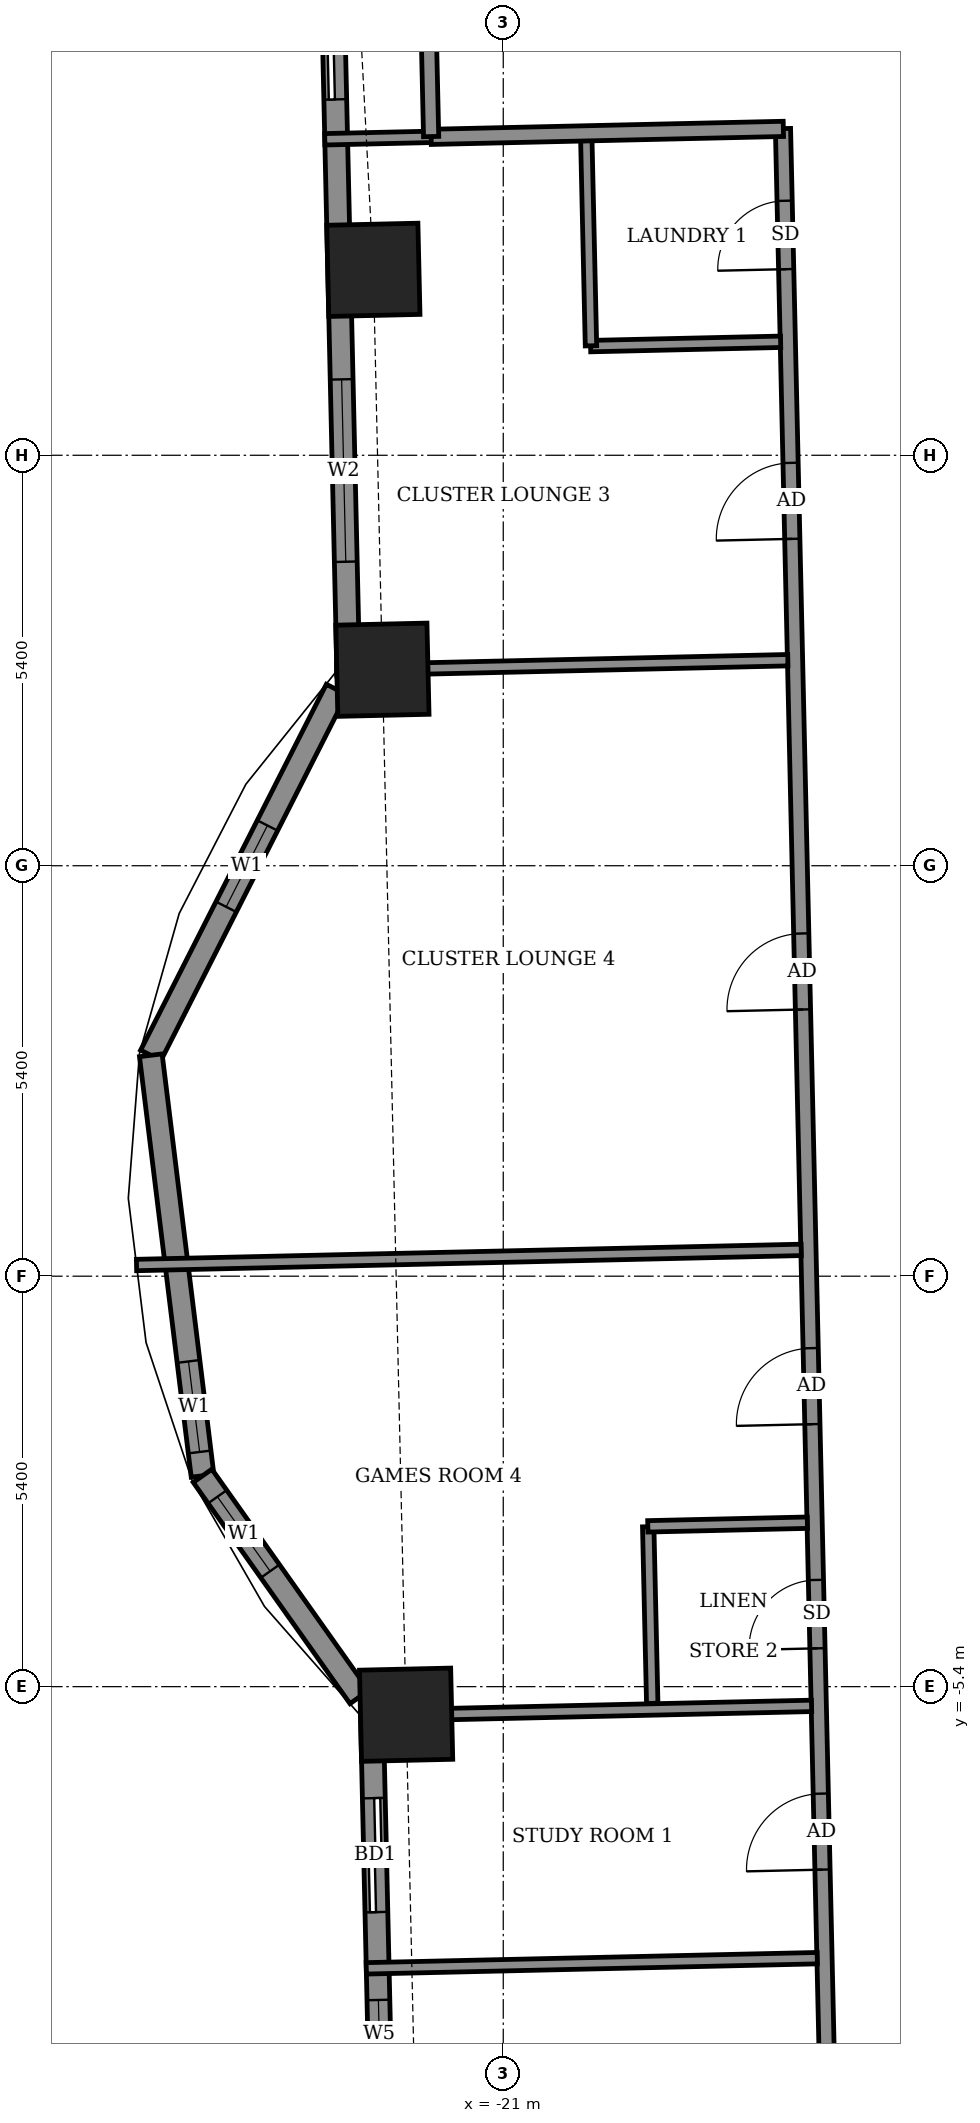
"""IFC4 building model, lengths in metres.
Left out: names, types, materials, properties, quantities, classifications, styles, units other than length and angle.
Written with IfcOpenShell. Run it as: python <this file> out.ifc"""

import sys

from ifc_helpers import new_model, si_unit, direction, frame, frame_2d, origin, origin_2d, place, context, subcontext, project, spatial, rectangle, extrude, element, fill, save


model = new_model("IFC4")
c1 = context("Model", 3, precision=1e-05, world=origin(), true_north=direction((0.0, 1.0)))
c2 = subcontext(c1, "Body", "Model", "MODEL_VIEW")
j1 = project(units=[si_unit("LENGTHUNIT", "METRE"), si_unit("PLANEANGLEUNIT", "RADIAN")], contexts=[c1])
p1 = place(None, origin())
s1 = spatial("IfcSite", under=j1, at=p1, CompositionType="ELEMENT")
p2 = place(p1, origin())
s2 = spatial("IfcBuilding", under=s1, at=p2, CompositionType="ELEMENT")
p3 = place(p2, frame((0.0, 0.0, 182.5)))
s3 = spatial("IfcBuildingStorey", under=s2, at=p3, CompositionType="ELEMENT", Elevation=182.5)
for number, where, z_axis, x_axis in (
    (1, (-22.278, -5.769, -0.55), (0.0, 0.0, 1.0), (0.023, -1.0, 0.0)),
    (2, (-22.709, 13.24, -0.55), (0.0, 0.0, 1.0), (0.023, -1.0, 0.0)),
    (3, (-22.59, 7.979, -0.55), (0.0, 0.0, 1.0), (0.023, -1.0, 0.0)),
):
    element("IfcColumn", number, at=place(p3, frame(where, z_axis=z_axis, x_axis=x_axis)), inside=s3, PredefinedType="COLUMN", context=c2, shape_type="SweptSolid", body=[
        extrude(rectangle(XDim=1.2, YDim=1.2, at=origin_2d()), origin(), (0.0, 0.0, 1.0), 3.6),
    ])
p4 = place(p3, frame((-23.275, 18.34, 0.0), z_axis=(0.0, 0.0, 1.0), x_axis=(0.022705985163, -0.999742185885, 0.0)))
e4 = element("IfcWall", 4, at=p4, inside=s3, PredefinedType="SOLIDWALL", context=c2, shape_type="SweptSolid", body=[
    extrude(rectangle(XDim=10.43, YDim=0.3, at=frame_2d((5.215, 0.0))), origin(), (0.0, 0.0, 1.0), 3.05),
])
p5 = place(p4, frame((1.359, 0.0, 0.0)))
e5 = element("IfcOpeningElement", 5, at=p5, cuts=e4, PredefinedType="OPENING", context=c2, shape_type="SweptSolid", body=[
    extrude(rectangle(XDim=1.5, YDim=2.4, at=frame_2d((0.75, 1.2))), frame((0.0, 0.16, 0.0), z_axis=(0.0, -1.0, 0.0), x_axis=(1.0, 0.0, 0.0)), (0.0, 0.0, 1.0), 0.32),
])
p6 = place(p4, frame((6.543, 0.0, 0.9)))
e6 = element("IfcOpeningElement", 6, at=p6, cuts=e4, PredefinedType="OPENING", context=c2, shape_type="SweptSolid", body=[
    extrude(rectangle(XDim=2.4, YDim=1.5, at=frame_2d((1.2, 0.75))), frame((0.0, 0.16, 0.0), z_axis=(0.0, -1.0, 0.0), x_axis=(1.0, 0.0, 0.0)), (0.0, 0.0, 1.0), 0.32),
])
p7 = place(p3, frame((-23.194, 7.719, 0.0), z_axis=(0.0, 0.0, 1.0), x_axis=(-0.452597193435, -0.891715078091, 0.0)))
e7 = element("IfcWall", 7, at=p7, inside=s3, PredefinedType="SOLIDWALL", context=c2, shape_type="SweptSolid", body=[
    extrude(rectangle(XDim=5.397, YDim=0.3, at=frame_2d((2.699, 0.0))), origin(), (0.0, 0.0, 1.0), 3.05),
])
p8 = place(p7, frame((2.007, 0.0, 0.9)))
e8 = element("IfcOpeningElement", 8, at=p8, cuts=e7, PredefinedType="OPENING", context=c2, shape_type="SweptSolid", body=[
    extrude(rectangle(XDim=1.2, YDim=1.5, at=frame_2d((0.6, 0.75))), frame((0.0, 0.16, 0.0), z_axis=(0.0, -1.0, 0.0), x_axis=(1.0, 0.0, 0.0)), (0.0, 0.0, 1.0), 0.32),
])
p9 = place(p3, frame((-25.637, 2.906, 0.0), z_axis=(0.0, 0.0, 1.0), x_axis=(0.122163831021, -0.992509948761, 0.0)))
e9 = element("IfcWall", 9, at=p9, inside=s3, PredefinedType="SOLIDWALL", context=c2, shape_type="SweptSolid", body=[
    extrude(rectangle(XDim=5.574, YDim=0.3, at=frame_2d((2.787, 0.0))), origin(), (0.0, 0.0, 1.0), 3.05),
])
p10 = place(p9, frame((4.058, 0.0, 0.9)))
e10 = element("IfcOpeningElement", 10, at=p10, cuts=e9, PredefinedType="OPENING", context=c2, shape_type="SweptSolid", body=[
    extrude(rectangle(XDim=1.2, YDim=1.5, at=frame_2d((0.6, 0.75))), frame((0.0, 0.16, 0.0), z_axis=(0.0, -1.0, 0.0), x_axis=(1.0, 0.0, 0.0)), (0.0, 0.0, 1.0), 0.32),
])
p11 = place(p3, frame((-24.956, -2.626, 0.0), z_axis=(0.0, 0.0, 1.0), x_axis=(0.578009745555, -0.816029861, 0.0)))
e11 = element("IfcWall", 11, at=p11, inside=s3, PredefinedType="SOLIDWALL", context=c2, shape_type="SweptSolid", body=[
    extrude(rectangle(XDim=3.567, YDim=0.3, at=frame_2d((1.784, 0.0))), origin(), (0.0, 0.0, 1.0), 3.05),
])
p12 = place(p11, frame((0.338, 0.0, 0.9)))
e12 = element("IfcOpeningElement", 12, at=p12, cuts=e11, PredefinedType="OPENING", context=c2, shape_type="SweptSolid", body=[
    extrude(rectangle(XDim=1.2, YDim=1.5, at=frame_2d((0.6, 0.75))), frame((0.0, 0.16, 0.0), z_axis=(0.0, -1.0, 0.0), x_axis=(1.0, 0.0, 0.0)), (0.0, 0.0, 1.0), 0.32),
])
p13 = place(p3, frame((-22.729, -5.725, 0.0), z_axis=(0.0, 0.0, 1.0), x_axis=(0.022726014582, -0.999741730779, 0.0)))
e13 = element("IfcWall", 13, at=p13, inside=s3, PredefinedType="SOLIDWALL", context=c2, shape_type="SweptSolid", body=[
    extrude(rectangle(XDim=10.829, YDim=0.3, at=frame_2d((5.414, 0.0))), origin(), (0.0, 0.0, 1.0), 3.05),
])
p14 = place(p13, frame((1.142, 0.0, 0.0)))
e14 = element("IfcOpeningElement", 14, at=p14, cuts=e13, PredefinedType="OPENING", context=c2, shape_type="SweptSolid", body=[
    extrude(rectangle(XDim=1.5, YDim=2.4, at=frame_2d((0.75, 1.2))), frame((0.0, 0.16, 0.0), z_axis=(0.0, -1.0, 0.0), x_axis=(1.0, 0.0, 0.0)), (0.0, 0.0, 1.0), 0.32),
])
p15 = place(p13, frame((3.798, 0.0, 0.9)))
e15 = element("IfcOpeningElement", 15, at=p15, cuts=e13, PredefinedType="OPENING", context=c2, shape_type="SweptSolid", body=[
    extrude(rectangle(XDim=0.9, YDim=1.5, at=frame_2d((0.45, 0.75))), frame((0.0, 0.16, 0.0), z_axis=(0.0, -1.0, 0.0), x_axis=(1.0, 0.0, 0.0)), (0.0, 0.0, 1.0), 0.32),
])
p16 = place(p13, frame((8.05, 0.0, 0.9)))
e16 = element("IfcOpeningElement", 16, at=p16, cuts=e13, PredefinedType="OPENING", context=c2, shape_type="SweptSolid", body=[
    extrude(rectangle(XDim=1.2, YDim=1.5, at=frame_2d((0.6, 0.75))), frame((0.0, 0.16, 0.0), z_axis=(0.0, -1.0, 0.0), x_axis=(1.0, 0.0, 0.0)), (0.0, 0.0, 1.0), 0.32),
])
p17 = place(p3, frame((-25.81, 8.155, 0.0), z_axis=(0.0, 0.0, 1.0), x_axis=(-0.022681332769, 0.999742745482, 0.0)))
e17 = element("IfcWall", 17, at=p17, inside=s3, PredefinedType="USERDEFINED", context=c2, shape_type="SweptSolid", body=[
    extrude(rectangle(XDim=3.875, YDim=0.55, at=frame_2d((1.938, 0.0))), origin(), (0.0, 0.0, 1.0), 0.8),
])
p18 = place(p3, frame((-25.308, -13.965, 0.0), z_axis=(0.0, 0.0, 1.0), x_axis=(-0.022662255828, 0.999743178102, 0.0)))
e18 = element("IfcWall", 18, at=p18, inside=s3, PredefinedType="USERDEFINED", context=c2, shape_type="SweptSolid", body=[
    extrude(rectangle(XDim=6.0, YDim=0.55, at=frame_2d((3.0, 0.0))), origin(), (0.0, 0.0, 1.0), 0.8),
])
p19 = place(p3, frame((-16.684, -12.919, 0.0), z_axis=(0.0, 0.0, 1.0), x_axis=(-0.022694293906, 0.999742451346, 0.0)))
e19 = element("IfcWall", 19, at=p19, inside=s3, PredefinedType="PARTITIONING", context=c2, shape_type="SweptSolid", body=[
    extrude(rectangle(XDim=28.024, YDim=0.2, at=frame_2d((14.012, 0.0))), origin(), (0.0, 0.0, 1.0), 3.05),
])
p20 = place(p19, frame((22.625, 0.0, 0.0)))
e20 = element("IfcOpeningElement", 20, at=p20, cuts=e19, PredefinedType="OPENING", context=c2, shape_type="SweptSolid", body=[
    extrude(rectangle(XDim=1.0, YDim=2.1, at=frame_2d((0.5, 1.05))), frame((0.0, 0.11, 0.0), z_axis=(0.0, -1.0, 0.0), x_axis=(1.0, 0.0, 0.0)), (0.0, 0.0, 1.0), 0.22),
])
p21 = place(p19, frame((26.174, 0.0, 0.0)))
e21 = element("IfcOpeningElement", 21, at=p21, cuts=e19, PredefinedType="OPENING", context=c2, shape_type="SweptSolid", body=[
    extrude(rectangle(XDim=0.9, YDim=2.1, at=frame_2d((0.45, 1.05))), frame((0.0, 0.11, 0.0), z_axis=(0.0, -1.0, 0.0), x_axis=(1.0, 0.0, 0.0)), (0.0, 0.0, 1.0), 0.22),
])
p22 = place(p19, frame((16.432, 0.0, 0.0)))
e22 = element("IfcOpeningElement", 22, at=p22, cuts=e19, PredefinedType="OPENING", context=c2, shape_type="SweptSolid", body=[
    extrude(rectangle(XDim=1.0, YDim=2.1, at=frame_2d((0.5, 1.05))), frame((0.0, 0.11, 0.0), z_axis=(0.0, -1.0, 0.0), x_axis=(1.0, 0.0, 0.0)), (0.0, 0.0, 1.0), 0.22),
])
p23 = place(p19, frame((10.975, 0.0, 0.0)))
e23 = element("IfcOpeningElement", 23, at=p23, cuts=e19, PredefinedType="OPENING", context=c2, shape_type="SweptSolid", body=[
    extrude(rectangle(XDim=1.0, YDim=2.1, at=frame_2d((0.5, 1.05))), frame((0.0, 0.11, 0.0), z_axis=(0.0, -1.0, 0.0), x_axis=(1.0, 0.0, 0.0)), (0.0, 0.0, 1.0), 0.22),
])
p24 = place(p19, frame((8.025, 0.0, 0.0)))
e24 = element("IfcOpeningElement", 24, at=p24, cuts=e19, PredefinedType="OPENING", context=c2, shape_type="SweptSolid", body=[
    extrude(rectangle(XDim=0.9, YDim=2.1, at=frame_2d((0.45, 1.05))), frame((0.0, 0.11, 0.0), z_axis=(0.0, -1.0, 0.0), x_axis=(1.0, 0.0, 0.0)), (0.0, 0.0, 1.0), 0.22),
])
p25 = place(p19, frame((5.113, 0.0, 0.0)))
e25 = element("IfcOpeningElement", 25, at=p25, cuts=e19, PredefinedType="OPENING", context=c2, shape_type="SweptSolid", body=[
    extrude(rectangle(XDim=1.0, YDim=2.1, at=frame_2d((0.5, 1.05))), frame((0.0, 0.11, 0.0), z_axis=(0.0, -1.0, 0.0), x_axis=(1.0, 0.0, 0.0)), (0.0, 0.0, 1.0), 0.22),
])
p26 = place(p3, frame((-22.802, -9.106, 0.0), z_axis=(0.0, 0.0, 1.0), x_axis=(0.999744927012, 0.022584970987, 0.0)))
e26 = element("IfcWall", 26, at=p26, inside=s3, PredefinedType="PARTITIONING", context=c2, shape_type="SweptSolid", body=[
    extrude(rectangle(XDim=5.935, YDim=0.15, at=frame_2d((2.967, 0.0))), origin(), (0.0, 0.0, 1.0), 2.55),
])
p27 = place(p3, frame((-22.578, -5.78, 0.0), z_axis=(0.0, 0.0, 1.0), x_axis=(0.999746200787, 0.022528515532, 0.0)))
e27 = element("IfcWall", 27, at=p27, inside=s3, PredefinedType="PARTITIONING", context=c2, shape_type="SweptSolid", body=[
    extrude(rectangle(XDim=5.635, YDim=0.15, at=frame_2d((2.818, 0.0))), origin(), (0.0, 0.0, 1.0), 3.05),
])
p28 = place(p3, frame((-19.04, -5.62, 0.0), z_axis=(0.0, 0.0, 1.0), x_axis=(-0.022788198363, 0.99974031529, 0.0)))
e28 = element("IfcWall", 28, at=p28, inside=s3, PredefinedType="PARTITIONING", context=c2, shape_type="SweptSolid", body=[
    extrude(rectangle(XDim=2.325, YDim=0.15, at=frame_2d((1.162, 0.0))), origin(), (0.0, 0.0, 1.0), 3.05),
])
p29 = place(p3, frame((-19.098, -3.291, 0.0), z_axis=(0.0, 0.0, 1.0), x_axis=(0.999737555419, 0.022908956429, 0.0)))
e29 = element("IfcWall", 29, at=p29, inside=s3, PredefinedType="PARTITIONING", context=c2, shape_type="SweptSolid", body=[
    extrude(rectangle(XDim=2.099, YDim=0.15, at=frame_2d((1.05, 0.0))), origin(), (0.0, 0.0, 1.0), 3.05),
])
p30 = place(p3, frame((-25.825, 0.147, 0.0), z_axis=(0.0, 0.0, 1.0), x_axis=(0.999741244423, 0.022747399821, 0.0)))
e30 = element("IfcWall", 30, at=p30, inside=s3, PredefinedType="PARTITIONING", context=c2, shape_type="SweptSolid", body=[
    extrude(rectangle(XDim=8.747, YDim=0.15, at=frame_2d((4.374, 0.0))), origin(), (0.0, 0.0, 1.0), 2.05),
])
p31 = place(p3, frame((-23.19, 7.969, 0.0), z_axis=(0.0, 0.0, 1.0), x_axis=(0.999741261868, 0.022746633113, 0.0)))
e31 = element("IfcWall", 31, at=p31, inside=s3, PredefinedType="PARTITIONING", context=c2, shape_type="SweptSolid", body=[
    extrude(rectangle(XDim=5.935, YDim=0.15, at=frame_2d((2.968, 0.0))), origin(), (0.0, 0.0, 1.0), 3.05),
])
p32 = place(p3, frame((-19.851, 12.236, 0.0), z_axis=(0.0, 0.0, 1.0), x_axis=(0.999741230352, 0.02274801823, 0.0)))
e32 = element("IfcWall", 32, at=p32, inside=s3, PredefinedType="PARTITIONING", context=c2, shape_type="SweptSolid", body=[
    extrude(rectangle(XDim=2.501, YDim=0.15, at=frame_2d((1.25, 0.0))), origin(), (0.0, 0.0, 1.0), 3.05),
])
p33 = place(p3, frame((-19.846, 12.24, 0.0), z_axis=(0.0, 0.0, 1.0), x_axis=(-0.02260842146, 0.999744396973, 0.0)))
e33 = element("IfcWall", 33, at=p33, inside=s3, PredefinedType="PARTITIONING", context=c2, shape_type="SweptSolid", body=[
    extrude(rectangle(XDim=2.7, YDim=0.15, at=frame_2d((1.35, 0.0))), origin(), (0.0, 0.0, 1.0), 3.05),
])
p34 = place(p3, frame((-23.348, 14.957, 0.0), z_axis=(0.0, 0.0, 1.0), x_axis=(0.999740216184, 0.022792545827, 0.0)))
e34 = element("IfcWall", 34, at=p34, inside=s3, PredefinedType="PARTITIONING", context=c2, shape_type="SweptSolid", body=[
    extrude(rectangle(XDim=1.403, YDim=0.15, at=frame_2d((0.702, 0.0))), origin(), (0.0, 0.0, 1.0), 2.55),
])
p35 = place(p3, frame((-21.949, 14.989, 0.0), z_axis=(0.0, 0.0, 1.0), x_axis=(0.999743491588, 0.022648422179, 0.0)))
e35 = element("IfcWall", 35, at=p35, inside=s3, PredefinedType="PARTITIONING", context=c2, shape_type="SweptSolid", body=[
    extrude(rectangle(XDim=4.635, YDim=0.2, at=frame_2d((2.318, 0.0))), origin(), (0.0, 0.0, 1.0), 3.05),
])
p36 = place(p3, frame((-21.949, 14.993, 0.0), z_axis=(0.0, 0.0, 1.0), x_axis=(-0.022617910375, 0.999744182344, 0.0)))
e36 = element("IfcWall", 36, at=p36, inside=s3, PredefinedType="PARTITIONING", context=c2, shape_type="SweptSolid", body=[
    extrude(rectangle(XDim=1.5, YDim=0.2, at=frame_2d((0.75, 0.0))), origin(), (0.0, 0.0, 1.0), 3.05),
])
p37 = place(p5, origin())
e37 = element("IfcDoor", 37, at=p37, inside=s3, OperationType="SLIDING_TO_LEFT", PredefinedType="DOOR", context=c2, shape_type="SweptSolid", body=[
    extrude(rectangle(XDim=1.5, YDim=2.4, at=frame_2d((0.75, 1.2))), frame((0.0, 0.025, 0.0), z_axis=(0.0, -1.0, 0.0), x_axis=(1.0, 0.0, 0.0)), (0.0, 0.0, 1.0), 0.05),
])
fill(e5, e37)
p38 = place(p6, origin())
e38 = element("IfcWindow", 38, at=p38, inside=s3, PartitioningType="DOUBLE_PANEL_VERTICAL", PredefinedType="WINDOW", context=c2, shape_type="SweptSolid", body=[
    extrude(rectangle(XDim=2.4, YDim=1.5, at=frame_2d((1.2, 0.75))), frame((0.0, 0.03, 0.0), z_axis=(0.0, -1.0, 0.0), x_axis=(1.0, 0.0, 0.0)), (0.0, 0.0, 1.0), 0.06),
])
fill(e6, e38)
p39 = place(p8, origin())
e39 = element("IfcWindow", 39, at=p39, inside=s3, PartitioningType="SINGLE_PANEL", PredefinedType="WINDOW", context=c2, shape_type="SweptSolid", body=[
    extrude(rectangle(XDim=1.2, YDim=1.5, at=frame_2d((0.6, 0.75))), frame((0.0, 0.03, 0.0), z_axis=(0.0, -1.0, 0.0), x_axis=(1.0, 0.0, 0.0)), (0.0, 0.0, 1.0), 0.06),
])
fill(e8, e39)
p40 = place(p10, origin())
e40 = element("IfcWindow", 40, at=p40, inside=s3, PartitioningType="SINGLE_PANEL", PredefinedType="WINDOW", context=c2, shape_type="SweptSolid", body=[
    extrude(rectangle(XDim=1.2, YDim=1.5, at=frame_2d((0.6, 0.75))), frame((0.0, 0.03, 0.0), z_axis=(0.0, -1.0, 0.0), x_axis=(1.0, 0.0, 0.0)), (0.0, 0.0, 1.0), 0.06),
])
fill(e10, e40)
p41 = place(p12, origin())
e41 = element("IfcWindow", 41, at=p41, inside=s3, PartitioningType="SINGLE_PANEL", PredefinedType="WINDOW", context=c2, shape_type="SweptSolid", body=[
    extrude(rectangle(XDim=1.2, YDim=1.5, at=frame_2d((0.6, 0.75))), frame((0.0, 0.03, 0.0), z_axis=(0.0, -1.0, 0.0), x_axis=(1.0, 0.0, 0.0)), (0.0, 0.0, 1.0), 0.06),
])
fill(e12, e41)
p42 = place(p14, origin())
e42 = element("IfcDoor", 42, at=p42, inside=s3, OperationType="SLIDING_TO_LEFT", PredefinedType="DOOR", context=c2, shape_type="SweptSolid", body=[
    extrude(rectangle(XDim=1.5, YDim=2.4, at=frame_2d((0.75, 1.2))), frame((0.0, 0.025, 0.0), z_axis=(0.0, -1.0, 0.0), x_axis=(1.0, 0.0, 0.0)), (0.0, 0.0, 1.0), 0.05),
])
fill(e14, e42)
p43 = place(p15, origin())
e43 = element("IfcWindow", 43, at=p43, inside=s3, PartitioningType="SINGLE_PANEL", PredefinedType="WINDOW", context=c2, shape_type="SweptSolid", body=[
    extrude(rectangle(XDim=0.9, YDim=1.5, at=frame_2d((0.45, 0.75))), frame((0.0, 0.03, 0.0), z_axis=(0.0, -1.0, 0.0), x_axis=(1.0, 0.0, 0.0)), (0.0, 0.0, 1.0), 0.06),
])
fill(e15, e43)
p44 = place(p20, origin())
e44 = element("IfcDoor", 44, at=p44, inside=s3, OperationType="SINGLE_SWING_LEFT", PredefinedType="DOOR", context=c2, shape_type="SweptSolid", body=[
    extrude(rectangle(XDim=1.0, YDim=2.1, at=frame_2d((0.5, 1.05))), frame((0.0, 0.025, 0.0), z_axis=(0.0, -1.0, 0.0), x_axis=(1.0, 0.0, 0.0)), (0.0, 0.0, 1.0), 0.05),
])
fill(e20, e44)
p45 = place(p21, origin())
e45 = element("IfcDoor", 45, at=p45, inside=s3, OperationType="SINGLE_SWING_LEFT", PredefinedType="DOOR", context=c2, shape_type="SweptSolid", body=[
    extrude(rectangle(XDim=0.9, YDim=2.1, at=frame_2d((0.45, 1.05))), frame((0.0, 0.025, 0.0), z_axis=(0.0, -1.0, 0.0), x_axis=(1.0, 0.0, 0.0)), (0.0, 0.0, 1.0), 0.05),
])
fill(e21, e45)
p46 = place(p22, origin())
e46 = element("IfcDoor", 46, at=p46, inside=s3, OperationType="SINGLE_SWING_RIGHT", PredefinedType="DOOR", context=c2, shape_type="SweptSolid", body=[
    extrude(rectangle(XDim=1.0, YDim=2.1, at=frame_2d((0.5, 1.05))), frame((0.0, 0.025, 0.0), z_axis=(0.0, -1.0, 0.0), x_axis=(1.0, 0.0, 0.0)), (0.0, 0.0, 1.0), 0.05),
])
fill(e22, e46)
p47 = place(p23, origin())
e47 = element("IfcDoor", 47, at=p47, inside=s3, OperationType="SINGLE_SWING_LEFT", PredefinedType="DOOR", context=c2, shape_type="SweptSolid", body=[
    extrude(rectangle(XDim=1.0, YDim=2.1, at=frame_2d((0.5, 1.05))), frame((0.0, 0.025, 0.0), z_axis=(0.0, -1.0, 0.0), x_axis=(1.0, 0.0, 0.0)), (0.0, 0.0, 1.0), 0.05),
])
fill(e23, e47)
p48 = place(p24, origin())
e48 = element("IfcDoor", 48, at=p48, inside=s3, OperationType="SINGLE_SWING_RIGHT", PredefinedType="DOOR", context=c2, shape_type="SweptSolid", body=[
    extrude(rectangle(XDim=0.9, YDim=2.1, at=frame_2d((0.45, 1.05))), frame((0.0, 0.025, 0.0), z_axis=(0.0, -1.0, 0.0), x_axis=(1.0, 0.0, 0.0)), (0.0, 0.0, 1.0), 0.05),
])
fill(e24, e48)
p49 = place(p25, origin())
e49 = element("IfcDoor", 49, at=p49, inside=s3, OperationType="SINGLE_SWING_RIGHT", PredefinedType="DOOR", context=c2, shape_type="SweptSolid", body=[
    extrude(rectangle(XDim=1.0, YDim=2.1, at=frame_2d((0.5, 1.05))), frame((0.0, 0.025, 0.0), z_axis=(0.0, -1.0, 0.0), x_axis=(1.0, 0.0, 0.0)), (0.0, 0.0, 1.0), 0.05),
])
fill(e25, e49)
save(model, sys.argv[1])
